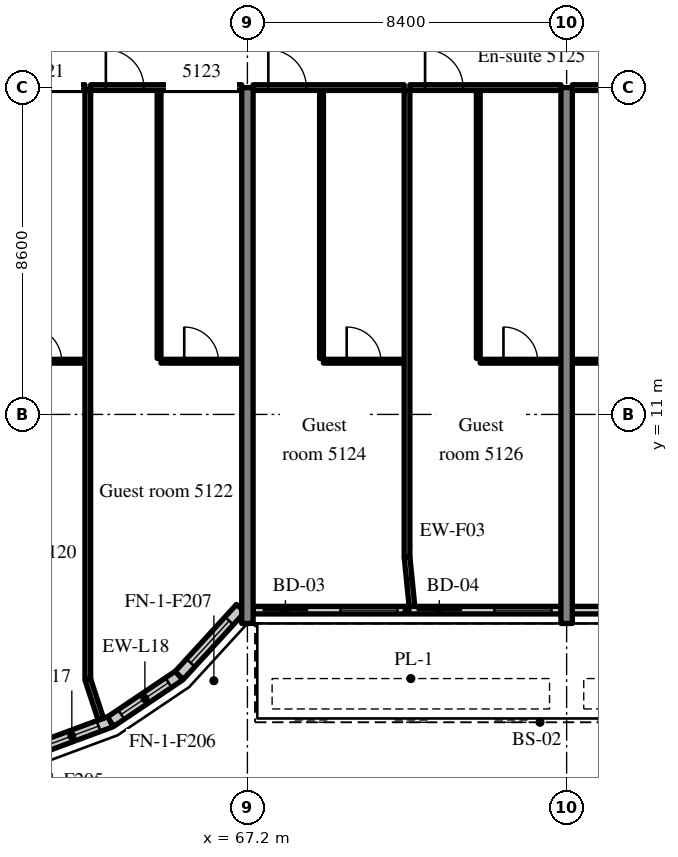
"""IFC4 building model, lengths in metres.
Left out: names, types, materials, properties, quantities, classifications, styles, units other than length and angle.
Written with IfcOpenShell. Run it as: python <this file> out.ifc"""

import sys

from ifc_helpers import new_model, si_unit, direction, frame, frame_2d, origin, place, context, subcontext, project, spatial, rectangle, extrude, source, transform, mapped, element, fill, save


model = new_model("IFC4")
c1 = context("Model", 3, precision=1e-05, world=origin(), true_north=direction((0.0, 1.0)))
c2 = subcontext(c1, "Body", "Model", "MODEL_VIEW")
j1 = project(units=[si_unit("LENGTHUNIT", "METRE"), si_unit("PLANEANGLEUNIT", "RADIAN")], contexts=[c1])
p1 = place(None, origin())
s1 = spatial("IfcSite", under=j1, at=p1, CompositionType="ELEMENT")
p2 = place(p1, origin())
s2 = spatial("IfcBuilding", under=s1, at=p2, CompositionType="ELEMENT")
p3 = place(p2, frame((0.0, 0.0, 214.0)))
s3 = spatial("IfcBuildingStorey", under=s2, at=p3, CompositionType="ELEMENT", Elevation=214.0)
m1 = source(origin(), c2, "Body", "SweptSolid", [
    extrude(rectangle(XDim=14.1, YDim=0.3, at=frame_2d((7.05, 0.0))), origin(), (0.0, 0.0, 1.0), 3.62),
])
for number, where, z_axis, x_axis in (
    (1, (67.2, 5.5, 0.0), (0.0, 0.0, 1.0), (0.0, 1.0, 0.0)),
    (2, (75.6, 5.5, 0.0), (0.0, 0.0, 1.0), (0.0, 1.0, 0.0)),
):
    element("IfcWall", number, at=place(p3, frame(where, z_axis=z_axis, x_axis=x_axis)), inside=s3, PredefinedType="SHEAR", context=c2, shape_type="MappedRepresentation", body=[
        mapped(m1, transform((0.0, 0.0, 0.0), scale=1.0)),
    ])
m2 = source(origin(), c2, "Body", "SweptSolid", [
    extrude(rectangle(XDim=2.176, YDim=0.3, at=frame_2d((1.088, 0.0))), origin(), (0.0, 0.0, 1.0), 3.62),
])
p4 = place(p3, frame((61.56, 2.16, 0.0), z_axis=(0.0, 0.0, 1.0), x_axis=(0.937531979054, 0.347899106424, 0.0)))
e3 = element("IfcWall", 3, at=p4, inside=s3, PredefinedType="SOLIDWALL", context=c2, shape_type="MappedRepresentation", body=[
    mapped(m2, transform((0.0, 0.0, 0.0), scale=1.0)),
])
m3 = source(origin(), c2, "Body", "SweptSolid", [
    extrude(rectangle(XDim=1.5, YDim=2.0, at=frame_2d((0.75, 1.0))), frame((0.0, 0.16, 0.0), z_axis=(0.0, -1.0, 0.0), x_axis=(1.0, 0.0, 0.0)), (0.0, 0.0, 1.0), 0.32),
])
p5 = place(p4, frame((0.338, 0.0, 0.9)))
e4 = element("IfcOpeningElement", 4, at=p5, cuts=e3, PredefinedType="OPENING", context=c2, shape_type="MappedRepresentation", body=[
    mapped(m3, transform((0.0, 0.0, 0.0), scale=1.0)),
])
m4 = source(origin(), c2, "Body", "SweptSolid", [
    extrude(rectangle(XDim=2.176, YDim=0.3, at=frame_2d((1.088, 0.0))), origin(), (0.0, 0.0, 1.0), 3.62),
])
p6 = place(p3, frame((63.599, 2.917, 0.0), z_axis=(0.0, 0.0, 1.0), x_axis=(0.829625727223, 0.558319937607, 0.0)))
e5 = element("IfcWall", 5, at=p6, inside=s3, PredefinedType="SOLIDWALL", context=c2, shape_type="MappedRepresentation", body=[
    mapped(m4, transform((0.0, 0.0, 0.0), scale=1.0)),
])
p7 = place(p6, frame((0.338, 0.0, 0.9)))
e6 = element("IfcOpeningElement", 6, at=p7, cuts=e5, PredefinedType="OPENING", context=c2, shape_type="MappedRepresentation", body=[
    mapped(m3, transform((0.0, 0.0, 0.0), scale=1.0)),
])
m5 = source(origin(), c2, "Body", "SweptSolid", [
    extrude(rectangle(XDim=2.398, YDim=0.3, at=frame_2d((1.199, 0.0))), origin(), (0.0, 0.0, 1.0), 3.62),
])
p8 = place(p3, frame((65.404, 4.131, 0.0), z_axis=(0.0, 0.0, 1.0), x_axis=(0.675374189419, 0.737475222815, 0.0)))
e7 = element("IfcWall", 7, at=p8, inside=s3, PredefinedType="SOLIDWALL", context=c2, shape_type="MappedRepresentation", body=[
    mapped(m5, transform((0.0, 0.0, 0.0), scale=1.0)),
])
p9 = place(p8, frame((0.449, 0.0, 0.9)))
e8 = element("IfcOpeningElement", 8, at=p9, cuts=e7, PredefinedType="OPENING", context=c2, shape_type="MappedRepresentation", body=[
    mapped(m3, transform((0.0, 0.0, 0.0), scale=1.0)),
])
m6 = source(origin(), c2, "Body", "SweptSolid", [
    extrude(rectangle(XDim=8.1, YDim=0.2, at=frame_2d((4.05, 0.0))), origin(), (0.0, 0.0, 1.0), 3.02),
])
p10 = place(p3, frame((67.35, 5.85, 0.0), z_axis=(0.0, 0.0, 1.0), x_axis=(1.0, 0.0, 0.0)))
e9 = element("IfcWall", 9, at=p10, inside=s3, PredefinedType="SOLIDWALL", context=c2, shape_type="MappedRepresentation", body=[
    mapped(m6, transform((0.0, 0.0, 0.0), scale=1.0)),
])
m7 = source(origin(), c2, "Body", "SweptSolid", [
    extrude(rectangle(XDim=1.2, YDim=2.4, at=frame_2d((0.6, 1.2))), frame((0.0, 0.11, 0.0), z_axis=(0.0, -1.0, 0.0), x_axis=(1.0, 0.0, 0.0)), (0.0, 0.0, 1.0), 0.22),
])
p11 = place(p10, frame((0.25, 0.0, 0.0)))
e10 = element("IfcOpeningElement", 10, at=p11, cuts=e9, PredefinedType="OPENING", context=c2, shape_type="MappedRepresentation", body=[
    mapped(m7, transform((0.0, 0.0, 0.0), scale=1.0)),
])
m8 = source(origin(), c2, "Body", "SweptSolid", [
    extrude(rectangle(XDim=1.5, YDim=1.5, at=frame_2d((0.75, 0.75))), frame((0.0, 0.11, 0.0), z_axis=(0.0, -1.0, 0.0), x_axis=(1.0, 0.0, 0.0)), (0.0, 0.0, 1.0), 0.22),
])
p12 = place(p10, frame((2.3, 0.0, 0.9)))
e11 = element("IfcOpeningElement", 11, at=p12, cuts=e9, PredefinedType="OPENING", context=c2, shape_type="MappedRepresentation", body=[
    mapped(m8, transform((0.0, 0.0, 0.0), scale=1.0)),
])
p13 = place(p10, frame((4.3, 0.0, 0.0)))
e12 = element("IfcOpeningElement", 12, at=p13, cuts=e9, PredefinedType="OPENING", context=c2, shape_type="MappedRepresentation", body=[
    mapped(m7, transform((0.0, 0.0, 0.0), scale=1.0)),
])
p14 = place(p10, frame((6.35, 0.0, 0.9)))
e13 = element("IfcOpeningElement", 13, at=p14, cuts=e9, PredefinedType="OPENING", context=c2, shape_type="MappedRepresentation", body=[
    mapped(m8, transform((0.0, 0.0, 0.0), scale=1.0)),
])
m9 = source(origin(), c2, "Body", "SweptSolid", [
    extrude(rectangle(XDim=6.505, YDim=0.2, at=frame_2d((3.252, 0.0))), origin(), (0.0, 0.0, 1.0), 3.02),
])
p15 = place(p3, frame((75.75, 5.85, 0.0), z_axis=(0.0, 0.0, 1.0), x_axis=(1.0, 0.0, 0.0)))
e14 = element("IfcWall", 14, at=p15, inside=s3, PredefinedType="SOLIDWALL", context=c2, shape_type="MappedRepresentation", body=[
    mapped(m9, transform((0.0, 0.0, 0.0), scale=1.0)),
])
p16 = place(p15, frame((0.876, 0.0, 0.9)))
e15 = element("IfcOpeningElement", 15, at=p16, cuts=e14, PredefinedType="OPENING", context=c2, shape_type="MappedRepresentation", body=[
    mapped(m8, transform((0.0, 0.0, 0.0), scale=1.0)),
])
p17 = place(p15, frame((4.129, 0.0, 0.9)))
e16 = element("IfcOpeningElement", 16, at=p17, cuts=e14, PredefinedType="OPENING", context=c2, shape_type="MappedRepresentation", body=[
    mapped(m8, transform((0.0, 0.0, 0.0), scale=1.0)),
])
m10 = source(origin(), c2, "Body", "SweptSolid", [
    extrude(rectangle(XDim=2.125, YDim=0.1, at=frame_2d((1.062, 0.0))), origin(), (0.0, 0.0, 1.0), 3.62),
])
p18 = place(p3, frame((60.8, 12.4, 0.0), z_axis=(0.0, 0.0, 1.0), x_axis=(1.0, 0.0, 0.0)))
e17 = element("IfcWall", 17, at=p18, inside=s3, PredefinedType="PARTITIONING", context=c2, shape_type="MappedRepresentation", body=[
    mapped(m10, transform((0.0, 0.0, 0.0), scale=1.0)),
])
m11 = source(origin(), c2, "Body", "SweptSolid", [
    extrude(rectangle(XDim=0.9, YDim=2.1, at=frame_2d((0.45, 1.05))), frame((0.0, 0.06, 0.0), z_axis=(0.0, -1.0, 0.0), x_axis=(1.0, 0.0, 0.0)), (0.0, 0.0, 1.0), 0.12),
])
p19 = place(p18, frame((0.612, 0.0, 0.0)))
e18 = element("IfcOpeningElement", 18, at=p19, cuts=e17, PredefinedType="OPENING", context=c2, shape_type="MappedRepresentation", body=[
    mapped(m11, transform((0.0, 0.0, 0.0), scale=1.0)),
])
m12 = source(origin(), c2, "Body", "SweptSolid", [
    extrude(rectangle(XDim=3.975, YDim=0.15, at=frame_2d((1.988, 0.0))), origin(), (0.0, 0.0, 1.0), 2.92),
])
p20 = place(p3, frame((58.95, 19.6, 0.0), z_axis=(0.0, 0.0, 1.0), x_axis=(1.0, 0.0, 0.0)))
e19 = element("IfcWall", 19, at=p20, inside=s3, PredefinedType="PARTITIONING", context=c2, shape_type="MappedRepresentation", body=[
    mapped(m12, transform((0.0, 0.0, 0.0), scale=1.0)),
])
m13 = source(origin(), c2, "Body", "SweptSolid", [
    extrude(rectangle(XDim=1.0, YDim=2.1, at=frame_2d((0.5, 1.05))), frame((0.0, 0.085, 0.0), z_axis=(0.0, -1.0, 0.0), x_axis=(1.0, 0.0, 0.0)), (0.0, 0.0, 1.0), 0.17),
])
p21 = place(p20, frame((0.4, 0.0, 0.0)))
e20 = element("IfcOpeningElement", 20, at=p21, cuts=e19, PredefinedType="OPENING", context=c2, shape_type="MappedRepresentation", body=[
    mapped(m13, transform((0.0, 0.0, 0.0), scale=1.0)),
])
m14 = source(origin(), c2, "Body", "SweptSolid", [
    extrude(rectangle(XDim=7.05, YDim=0.1, at=frame_2d((3.525, 0.0))), origin(), (0.0, 0.0, 1.0), 3.62),
])
p22 = place(p3, frame((64.875, 12.475, 0.0), z_axis=(0.0, 0.0, 1.0), x_axis=(0.0, 1.0, 0.0)))
e21 = element("IfcWall", 21, at=p22, inside=s3, PredefinedType="PARTITIONING", context=c2, shape_type="MappedRepresentation", body=[
    mapped(m14, transform((0.0, 0.0, 0.0), scale=1.0)),
])
p23 = place(p3, frame((64.925, 12.4, 0.0), z_axis=(0.0, 0.0, 1.0), x_axis=(1.0, 0.0, 0.0)))
e22 = element("IfcWall", 22, at=p23, inside=s3, PredefinedType="PARTITIONING", context=c2, shape_type="MappedRepresentation", body=[
    mapped(m10, transform((0.0, 0.0, 0.0), scale=1.0)),
])
p24 = place(p23, frame((0.612, 0.0, 0.0)))
e23 = element("IfcOpeningElement", 23, at=p24, cuts=e22, PredefinedType="OPENING", context=c2, shape_type="MappedRepresentation", body=[
    mapped(m11, transform((0.0, 0.0, 0.0), scale=1.0)),
])
p25 = place(p3, frame((63.075, 19.6, 0.0), z_axis=(0.0, 0.0, 1.0), x_axis=(1.0, 0.0, 0.0)))
e24 = element("IfcWall", 24, at=p25, inside=s3, PredefinedType="PARTITIONING", context=c2, shape_type="MappedRepresentation", body=[
    mapped(m12, transform((0.0, 0.0, 0.0), scale=1.0)),
])
p26 = place(p25, frame((0.4, 0.0, 0.0)))
e25 = element("IfcOpeningElement", 25, at=p26, cuts=e24, PredefinedType="OPENING", context=c2, shape_type="MappedRepresentation", body=[
    mapped(m13, transform((0.0, 0.0, 0.0), scale=1.0)),
])
m15 = source(origin(), c2, "Body", "SweptSolid", [
    extrude(rectangle(XDim=15.498, YDim=0.15, at=frame_2d((7.749, 0.0))), origin(), (0.0, 0.0, 1.0), 3.62),
])
p27 = place(p3, frame((63.0, 4.027, 0.0), z_axis=(0.0, 0.0, 1.0), x_axis=(0.0, 1.0, 0.0)))
e26 = element("IfcWall", 26, at=p27, inside=s3, PredefinedType="PARTITIONING", context=c2, shape_type="MappedRepresentation", body=[
    mapped(m15, transform((0.0, 0.0, 0.0), scale=1.0)),
])
p28 = place(p3, frame((69.15, 12.475, 0.0), z_axis=(0.0, 0.0, 1.0), x_axis=(0.0, 1.0, 0.0)))
e27 = element("IfcWall", 27, at=p28, inside=s3, PredefinedType="PARTITIONING", context=c2, shape_type="MappedRepresentation", body=[
    mapped(m14, transform((0.0, 0.0, 0.0), scale=1.0)),
])
p29 = place(p3, frame((69.2, 12.4, 0.0), z_axis=(0.0, 0.0, 1.0), x_axis=(1.0, 0.0, 0.0)))
e28 = element("IfcWall", 28, at=p29, inside=s3, PredefinedType="PARTITIONING", context=c2, shape_type="MappedRepresentation", body=[
    mapped(m10, transform((0.0, 0.0, 0.0), scale=1.0)),
])
p30 = place(p29, frame((0.612, 0.0, 0.0)))
e29 = element("IfcOpeningElement", 29, at=p30, cuts=e28, PredefinedType="OPENING", context=c2, shape_type="MappedRepresentation", body=[
    mapped(m11, transform((0.0, 0.0, 0.0), scale=1.0)),
])
m16 = source(origin(), c2, "Body", "SweptSolid", [
    extrude(rectangle(XDim=3.975, YDim=0.15, at=frame_2d((1.987, 0.0))), origin(), (0.0, 0.0, 1.0), 2.92),
])
p31 = place(p3, frame((67.35, 19.6, 0.0), z_axis=(0.0, 0.0, 1.0), x_axis=(1.0, 0.0, 0.0)))
e30 = element("IfcWall", 30, at=p31, inside=s3, PredefinedType="PARTITIONING", context=c2, shape_type="MappedRepresentation", body=[
    mapped(m16, transform((0.0, 0.0, 0.0), scale=1.0)),
])
p32 = place(p31, frame((0.4, 0.0, 0.0)))
e31 = element("IfcOpeningElement", 31, at=p32, cuts=e30, PredefinedType="OPENING", context=c2, shape_type="MappedRepresentation", body=[
    mapped(m13, transform((0.0, 0.0, 0.0), scale=1.0)),
])
p33 = place(p3, frame((73.275, 12.475, 0.0), z_axis=(0.0, 0.0, 1.0), x_axis=(0.0, 1.0, 0.0)))
e32 = element("IfcWall", 32, at=p33, inside=s3, PredefinedType="PARTITIONING", context=c2, shape_type="MappedRepresentation", body=[
    mapped(m14, transform((0.0, 0.0, 0.0), scale=1.0)),
])
p34 = place(p3, frame((73.325, 12.4, 0.0), z_axis=(0.0, 0.0, 1.0), x_axis=(1.0, 0.0, 0.0)))
e33 = element("IfcWall", 33, at=p34, inside=s3, PredefinedType="PARTITIONING", context=c2, shape_type="MappedRepresentation", body=[
    mapped(m10, transform((0.0, 0.0, 0.0), scale=1.0)),
])
p35 = place(p34, frame((0.612, 0.0, 0.0)))
e34 = element("IfcOpeningElement", 34, at=p35, cuts=e33, PredefinedType="OPENING", context=c2, shape_type="MappedRepresentation", body=[
    mapped(m11, transform((0.0, 0.0, 0.0), scale=1.0)),
])
p36 = place(p3, frame((71.475, 19.6, 0.0), z_axis=(0.0, 0.0, 1.0), x_axis=(1.0, 0.0, 0.0)))
e35 = element("IfcWall", 35, at=p36, inside=s3, PredefinedType="PARTITIONING", context=c2, shape_type="MappedRepresentation", body=[
    mapped(m16, transform((0.0, 0.0, 0.0), scale=1.0)),
])
p37 = place(p36, frame((0.4, 0.0, 0.0)))
e36 = element("IfcOpeningElement", 36, at=p37, cuts=e35, PredefinedType="OPENING", context=c2, shape_type="MappedRepresentation", body=[
    mapped(m13, transform((0.0, 0.0, 0.0), scale=1.0)),
])
m17 = source(origin(), c2, "Body", "SweptSolid", [
    extrude(rectangle(XDim=12.275, YDim=0.15, at=frame_2d((6.137, 0.0))), origin(), (0.0, 0.0, 1.0), 3.62),
])
p38 = place(p3, frame((71.4, 7.25, 0.0), z_axis=(0.0, 0.0, 1.0), x_axis=(0.0, 1.0, 0.0)))
e37 = element("IfcWall", 37, at=p38, inside=s3, PredefinedType="PARTITIONING", context=c2, shape_type="MappedRepresentation", body=[
    mapped(m17, transform((0.0, 0.0, 0.0), scale=1.0)),
])
m18 = source(origin(), c2, "Body", "SweptSolid", [
    extrude(rectangle(XDim=2.5, YDim=0.1, at=frame_2d((1.25, 0.0))), origin(), (0.0, 0.0, 1.0), 3.62),
])
p39 = place(p3, frame((75.75, 12.4, 0.0), z_axis=(0.0, 0.0, 1.0), x_axis=(1.0, 0.0, 0.0)))
e38 = element("IfcWall", 38, at=p39, inside=s3, PredefinedType="PARTITIONING", context=c2, shape_type="MappedRepresentation", body=[
    mapped(m18, transform((0.0, 0.0, 0.0), scale=1.0)),
])
p40 = place(p39, frame((0.8, 0.0, 0.0)))
e39 = element("IfcOpeningElement", 39, at=p40, cuts=e38, PredefinedType="OPENING", context=c2, shape_type="MappedRepresentation", body=[
    mapped(m11, transform((0.0, 0.0, 0.0), scale=1.0)),
])
m19 = source(origin(), c2, "Body", "SweptSolid", [
    extrude(rectangle(XDim=7.95, YDim=0.15, at=frame_2d((3.975, 0.0))), origin(), (0.0, 0.0, 1.0), 2.92),
])
p41 = place(p3, frame((75.75, 19.6, 0.0), z_axis=(0.0, 0.0, 1.0), x_axis=(1.0, 0.0, 0.0)))
e40 = element("IfcWall", 40, at=p41, inside=s3, PredefinedType="PARTITIONING", context=c2, shape_type="MappedRepresentation", body=[
    mapped(m19, transform((0.0, 0.0, 0.0), scale=1.0)),
])
p42 = place(p41, frame((6.55, 0.0, 0.0)))
e41 = element("IfcOpeningElement", 41, at=p42, cuts=e40, PredefinedType="OPENING", context=c2, shape_type="MappedRepresentation", body=[
    mapped(m13, transform((0.0, 0.0, 0.0), scale=1.0)),
])
m20 = source(origin(), c2, "Body", "SweptSolid", [
    extrude(rectangle(XDim=1.101, YDim=0.15, at=frame_2d((0.55, 0.0))), origin(), (0.0, 0.0, 1.0), 3.62),
])
p43 = place(p3, frame((63.343, 2.981, 0.0), z_axis=(0.0, 0.0, 1.0), x_axis=(-0.311567081539, 0.950224159712, 0.0)))
e42 = element("IfcWall", 42, at=p43, inside=s3, PredefinedType="PARTITIONING", context=c2, shape_type="MappedRepresentation", body=[
    mapped(m20, transform((0.0, 0.0, 0.0), scale=1.0)),
])
m21 = source(origin(), c2, "Body", "SweptSolid", [
    extrude(rectangle(XDim=1.307, YDim=0.15, at=frame_2d((0.653, 0.0))), origin(), (0.0, 0.0, 1.0), 3.62),
])
p44 = place(p3, frame((71.53, 5.95, 0.0), z_axis=(0.0, 0.0, 1.0), x_axis=(-0.099596223396, 0.99502793543, 0.0)))
e43 = element("IfcWall", 43, at=p44, inside=s3, PredefinedType="PARTITIONING", context=c2, shape_type="MappedRepresentation", body=[
    mapped(m21, transform((0.0, 0.0, 0.0), scale=1.0)),
])
m22 = source(origin(), c2, "Body", "SweptSolid", [
    extrude(rectangle(XDim=1.5, YDim=2.0, at=frame_2d((0.75, 1.0))), frame((0.0, 0.03, 0.0), z_axis=(0.0, -1.0, 0.0), x_axis=(1.0, 0.0, 0.0)), (0.0, 0.0, 1.0), 0.06),
])
p45 = place(p5, origin())
e44 = element("IfcWindow", 44, at=p45, inside=s3, PartitioningType="SINGLE_PANEL", PredefinedType="WINDOW", context=c2, shape_type="MappedRepresentation", body=[
    mapped(m22, transform((0.0, 0.0, 0.0), scale=1.0)),
])
fill(e4, e44)
p46 = place(p7, origin())
e45 = element("IfcWindow", 45, at=p46, inside=s3, PartitioningType="SINGLE_PANEL", PredefinedType="WINDOW", context=c2, shape_type="MappedRepresentation", body=[
    mapped(m22, transform((0.0, 0.0, 0.0), scale=1.0)),
])
fill(e6, e45)
p47 = place(p9, origin())
e46 = element("IfcWindow", 46, at=p47, inside=s3, PartitioningType="SINGLE_PANEL", PredefinedType="WINDOW", context=c2, shape_type="MappedRepresentation", body=[
    mapped(m22, transform((0.0, 0.0, 0.0), scale=1.0)),
])
fill(e8, e46)
m23 = source(origin(), c2, "Body", "SweptSolid", [
    extrude(rectangle(XDim=1.2, YDim=2.4, at=frame_2d((0.6, 1.2))), frame((0.0, 0.025, 0.0), z_axis=(0.0, -1.0, 0.0), x_axis=(1.0, 0.0, 0.0)), (0.0, 0.0, 1.0), 0.05),
])
p48 = place(p11, origin())
e47 = element("IfcDoor", 47, at=p48, inside=s3, OperationType="SLIDING_TO_LEFT", PredefinedType="DOOR", context=c2, shape_type="MappedRepresentation", body=[
    mapped(m23, transform((0.0, 0.0, 0.0), scale=1.0)),
])
fill(e10, e47)
m24 = source(origin(), c2, "Body", "SweptSolid", [
    extrude(rectangle(XDim=1.5, YDim=1.5, at=frame_2d((0.75, 0.75))), frame((0.0, 0.03, 0.0), z_axis=(0.0, -1.0, 0.0), x_axis=(1.0, 0.0, 0.0)), (0.0, 0.0, 1.0), 0.06),
])
p49 = place(p12, origin())
e48 = element("IfcWindow", 48, at=p49, inside=s3, PartitioningType="SINGLE_PANEL", PredefinedType="WINDOW", context=c2, shape_type="MappedRepresentation", body=[
    mapped(m24, transform((0.0, 0.0, 0.0), scale=1.0)),
])
fill(e11, e48)
p50 = place(p13, origin())
e49 = element("IfcDoor", 49, at=p50, inside=s3, OperationType="SLIDING_TO_RIGHT", PredefinedType="DOOR", context=c2, shape_type="MappedRepresentation", body=[
    mapped(m23, transform((0.0, 0.0, 0.0), scale=1.0)),
])
fill(e12, e49)
p51 = place(p14, origin())
e50 = element("IfcWindow", 50, at=p51, inside=s3, PartitioningType="SINGLE_PANEL", PredefinedType="WINDOW", context=c2, shape_type="MappedRepresentation", body=[
    mapped(m24, transform((0.0, 0.0, 0.0), scale=1.0)),
])
fill(e13, e50)
m25 = source(origin(), c2, "Body", "SweptSolid", [
    extrude(rectangle(XDim=0.9, YDim=2.1, at=frame_2d((0.45, 1.05))), frame((0.0, 0.025, 0.0), z_axis=(0.0, -1.0, 0.0), x_axis=(1.0, 0.0, 0.0)), (0.0, 0.0, 1.0), 0.05),
])
p52 = place(p19, origin())
e51 = element("IfcDoor", 51, at=p52, inside=s3, OperationType="SINGLE_SWING_LEFT", PredefinedType="DOOR", context=c2, shape_type="MappedRepresentation", body=[
    mapped(m25, transform((0.0, 0.0, 0.0), scale=1.0)),
])
fill(e18, e51)
p53 = place(p24, origin())
e52 = element("IfcDoor", 52, at=p53, inside=s3, OperationType="SINGLE_SWING_LEFT", PredefinedType="DOOR", context=c2, shape_type="MappedRepresentation", body=[
    mapped(m25, transform((0.0, 0.0, 0.0), scale=1.0)),
])
fill(e23, e52)
m26 = source(origin(), c2, "Body", "SweptSolid", [
    extrude(rectangle(XDim=1.0, YDim=2.1, at=frame_2d((0.5, 1.05))), frame((0.0, 0.025, 0.0), z_axis=(0.0, -1.0, 0.0), x_axis=(1.0, 0.0, 0.0)), (0.0, 0.0, 1.0), 0.05),
])
p54 = place(p26, origin())
e53 = element("IfcDoor", 53, at=p54, inside=s3, OperationType="SINGLE_SWING_LEFT", PredefinedType="DOOR", context=c2, shape_type="MappedRepresentation", body=[
    mapped(m26, transform((0.0, 0.0, 0.0), scale=1.0)),
])
fill(e25, e53)
p55 = place(p30, origin())
e54 = element("IfcDoor", 54, at=p55, inside=s3, OperationType="SINGLE_SWING_LEFT", PredefinedType="DOOR", context=c2, shape_type="MappedRepresentation", body=[
    mapped(m25, transform((0.0, 0.0, 0.0), scale=1.0)),
])
fill(e29, e54)
p56 = place(p32, origin())
e55 = element("IfcDoor", 55, at=p56, inside=s3, OperationType="SINGLE_SWING_LEFT", PredefinedType="DOOR", context=c2, shape_type="MappedRepresentation", body=[
    mapped(m26, transform((0.0, 0.0, 0.0), scale=1.0)),
])
fill(e31, e55)
p57 = place(p35, origin())
e56 = element("IfcDoor", 56, at=p57, inside=s3, OperationType="SINGLE_SWING_LEFT", PredefinedType="DOOR", context=c2, shape_type="MappedRepresentation", body=[
    mapped(m25, transform((0.0, 0.0, 0.0), scale=1.0)),
])
fill(e34, e56)
p58 = place(p37, origin())
e57 = element("IfcDoor", 57, at=p58, inside=s3, OperationType="SINGLE_SWING_LEFT", PredefinedType="DOOR", context=c2, shape_type="MappedRepresentation", body=[
    mapped(m26, transform((0.0, 0.0, 0.0), scale=1.0)),
])
fill(e36, e57)
save(model, sys.argv[1])
